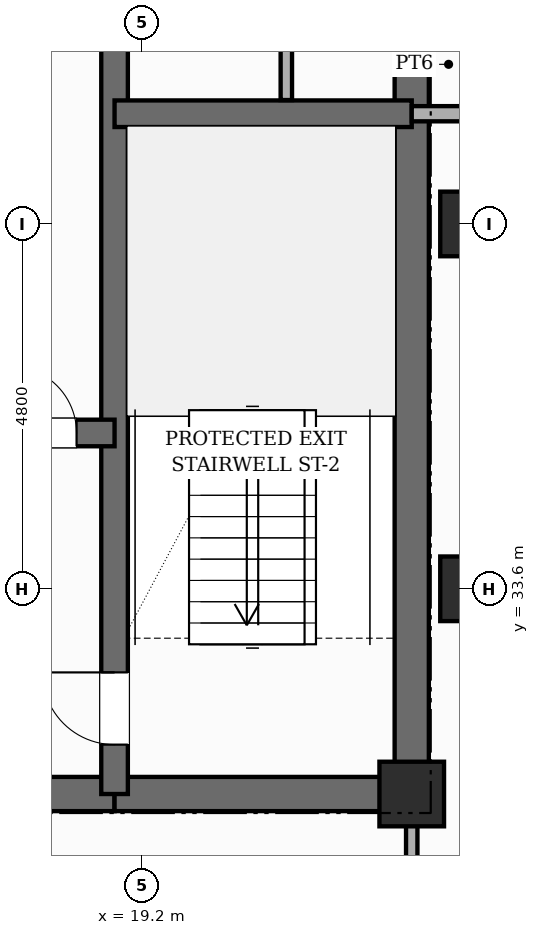
"""IFC4 building model, lengths in metres.
Left out: names, types, materials, properties, quantities, classifications, styles, units other than length and angle.
Written with IfcOpenShell. Run it as: python <this file> out.ifc"""

import sys

from ifc_helpers import new_model, si_unit, direction, frame, frame_2d, origin, origin_2d, place, context, subcontext, project, spatial, rectangle, extrude, element, fill, save


model = new_model("IFC4")
c1 = context("Model", 3, precision=1e-05, world=origin(), true_north=direction((0.0, 1.0)))
c2 = subcontext(c1, "Body", "Model", "MODEL_VIEW")
j1 = project(units=[si_unit("LENGTHUNIT", "METRE"), si_unit("PLANEANGLEUNIT", "RADIAN")], contexts=[c1])
p1 = place(None, origin())
s1 = spatial("IfcSite", under=j1, at=p1, CompositionType="ELEMENT")
p2 = place(p1, origin())
s2 = spatial("IfcBuilding", under=s1, at=p2, CompositionType="ELEMENT")
p3 = place(p2, frame((0.0, 0.0, 239.8)))
s3 = spatial("IfcBuildingStorey", under=s2, at=p3, CompositionType="ELEMENT", Elevation=239.8)
p4 = place(p3, frame((22.75, 30.675, 0.0), z_axis=(0.0, 0.0, 1.0), x_axis=(0.0, 1.0, 0.0)))
e1 = element("IfcWall", 1, at=p4, inside=s3, PredefinedType="SHEAR", context=c2, shape_type="SweptSolid", body=[
    extrude(rectangle(XDim=15.35, YDim=0.45, at=frame_2d((7.675, 0.0))), origin(), (0.0, 0.0, 1.0), 4.3),
])
p5 = place(p3, frame((9.96, 30.9, 0.0), z_axis=(0.0, 0.0, 1.0), x_axis=(1.0, 0.0, 0.0)))
e2 = element("IfcWall", 2, at=p5, inside=s3, PredefinedType="SHEAR", context=c2, shape_type="SweptSolid", body=[
    extrude(rectangle(XDim=8.88, YDim=0.45, at=frame_2d((4.44, 0.0))), origin(), (0.0, 0.0, 1.0), 4.3),
])
p6 = place(p5, frame((4.09, 0.0, 0.0)))
e3 = element("IfcOpeningElement", 3, at=p6, cuts=e2, PredefinedType="OPENING", context=c2, shape_type="SweptSolid", body=[
    extrude(rectangle(XDim=1.0, YDim=2.15, at=frame_2d((0.5, 1.075))), frame((0.0, 0.235, 0.0), z_axis=(0.0, -1.0, 0.0), x_axis=(1.0, 0.0, 0.0)), (0.0, 0.0, 1.0), 0.47),
])
p7 = place(p3, frame((18.84, 30.9, 0.0), z_axis=(0.0, 0.0, 1.0), x_axis=(1.0, 0.0, 0.0)))
e4 = element("IfcWall", 4, at=p7, inside=s3, PredefinedType="SHEAR", context=c2, shape_type="SweptSolid", body=[
    extrude(rectangle(XDim=3.91, YDim=0.45, at=frame_2d((1.955, 0.0))), origin(), (0.0, 0.0, 1.0), 4.3),
])
p8 = place(p3, frame((18.84, 30.9, 0.0), z_axis=(0.0, 0.0, 1.0), x_axis=(0.0, 1.0, 0.0)))
e5 = element("IfcWall", 5, at=p8, inside=s3, PredefinedType="SHEAR", context=c2, shape_type="SweptSolid", body=[
    extrude(rectangle(XDim=14.9, YDim=0.35, at=frame_2d((7.45, 0.0))), origin(), (0.0, 0.0, 1.0), 4.3),
])
p9 = place(p8, frame((0.65, 0.0, 0.0)))
e6 = element("IfcOpeningElement", 6, at=p9, cuts=e5, PredefinedType="OPENING", context=c2, shape_type="SweptSolid", body=[
    extrude(rectangle(XDim=0.95, YDim=2.1, at=frame_2d((0.475, 1.05))), frame((0.0, 0.185, 0.0), z_axis=(0.0, -1.0, 0.0), x_axis=(1.0, 0.0, 0.0)), (0.0, 0.0, 1.0), 0.37),
])
p10 = place(p8, frame((10.45, 0.0, 0.0)))
e7 = element("IfcOpeningElement", 7, at=p10, cuts=e5, PredefinedType="OPENING", context=c2, shape_type="SweptSolid", body=[
    extrude(rectangle(XDim=1.0, YDim=2.15, at=frame_2d((0.5, 1.075))), frame((0.0, 0.185, 0.0), z_axis=(0.0, -1.0, 0.0), x_axis=(1.0, 0.0, 0.0)), (0.0, 0.0, 1.0), 0.37),
])
p11 = place(p3, frame((18.84, 39.85, 0.0), z_axis=(0.0, 0.0, 1.0), x_axis=(1.0, 0.0, 0.0)))
e8 = element("IfcWall", 8, at=p11, inside=s3, PredefinedType="SHEAR", context=c2, shape_type="SweptSolid", body=[
    extrude(rectangle(XDim=3.91, YDim=0.35, at=frame_2d((1.955, 0.0))), origin(), (0.0, 0.0, 1.0), 4.3),
])
p12 = place(p3, frame((9.96, 35.65, 0.0), z_axis=(0.0, 0.0, 1.0), x_axis=(1.0, 0.0, 0.0)))
e9 = element("IfcWall", 9, at=p12, inside=s3, PredefinedType="SHEAR", context=c2, shape_type="SweptSolid", body=[
    extrude(rectangle(XDim=8.88, YDim=0.35, at=frame_2d((4.44, 0.0))), origin(), (0.0, 0.0, 1.0), 4.3),
])
p13 = place(p12, frame((0.84, 0.0, 0.0)))
e10 = element("IfcOpeningElement", 10, at=p13, cuts=e9, PredefinedType="OPENING", context=c2, shape_type="SweptSolid", body=[
    extrude(rectangle(XDim=1.1, YDim=2.15, at=frame_2d((0.55, 1.075))), frame((0.0, 0.185, 0.0), z_axis=(0.0, -1.0, 0.0), x_axis=(1.0, 0.0, 0.0)), (0.0, 0.0, 1.0), 0.37),
])
p14 = place(p12, frame((5.24, 0.0, 0.0)))
e11 = element("IfcOpeningElement", 11, at=p14, cuts=e9, PredefinedType="OPENING", context=c2, shape_type="SweptSolid", body=[
    extrude(rectangle(XDim=1.1, YDim=2.15, at=frame_2d((0.55, 1.075))), frame((0.0, 0.185, 0.0), z_axis=(0.0, -1.0, 0.0), x_axis=(1.0, 0.0, 0.0)), (0.0, 0.0, 1.0), 0.37),
])
p15 = place(p12, frame((7.5, 0.0, 0.0)))
e12 = element("IfcOpeningElement", 12, at=p15, cuts=e9, PredefinedType="OPENING", context=c2, shape_type="SweptSolid", body=[
    extrude(rectangle(XDim=0.88, YDim=2.1, at=frame_2d((0.44, 1.05))), frame((0.0, 0.185, 0.0), z_axis=(0.0, -1.0, 0.0), x_axis=(1.0, 0.0, 0.0)), (0.0, 0.0, 1.0), 0.37),
])
for number, where, z_axis, x_axis in (
    (13, (22.75, 30.9, 0.0), (0.0, 0.0, 1.0), (1.0, 0.0, 0.0)),
    (14, (23.55, 33.6, 0.0), (0.0, 0.0, 1.0), (1.0, 0.0, 0.0)),
    (15, (23.55, 38.4, 0.0), (0.0, 0.0, 1.0), (1.0, 0.0, 0.0)),
):
    element("IfcColumn", number, at=place(p3, frame(where, z_axis=z_axis, x_axis=x_axis)), inside=s3, PredefinedType="COLUMN", context=c2, shape_type="SweptSolid", body=[
        extrude(rectangle(XDim=0.85, YDim=0.85, at=origin_2d()), origin(), (0.0, 0.0, 1.0), 4.3),
    ])
p16 = place(p3, frame((21.1, 40.03, 0.0), z_axis=(0.0, 0.0, 1.0), x_axis=(0.0, 1.0, 0.0)))
e16 = element("IfcWall", 16, at=p16, inside=s3, PredefinedType="PARTITIONING", context=c2, shape_type="SweptSolid", body=[
    extrude(rectangle(XDim=5.77, YDim=0.15, at=frame_2d((2.885, 0.0))), origin(), (0.0, 0.0, 1.0), 4.04),
])
p17 = place(p16, frame((1.2, 0.0, 0.0)))
e17 = element("IfcOpeningElement", 17, at=p17, cuts=e16, PredefinedType="OPENING", context=c2, shape_type="SweptSolid", body=[
    extrude(rectangle(XDim=0.95, YDim=2.15, at=frame_2d((0.475, 1.075))), frame((0.0, 0.085, 0.0), z_axis=(0.0, -1.0, 0.0), x_axis=(1.0, 0.0, 0.0)), (0.0, 0.0, 1.0), 0.17),
])
p18 = place(p3, frame((22.75, 39.85, 0.0), z_axis=(0.0, 0.0, 1.0), x_axis=(1.0, 0.0, 0.0)))
e18 = element("IfcWall", 18, at=p18, inside=s3, PredefinedType="POLYGONAL", context=c2, shape_type="SweptSolid", body=[
    extrude(rectangle(XDim=0.97, YDim=0.2, at=frame_2d((0.485, 0.0))), origin(), (0.0, 0.0, 1.0), 4.04),
])
p19 = place(p3, frame((22.75, 25.75, 0.0), z_axis=(0.0, 0.0, 1.0), x_axis=(0.0, 1.0, 0.0)))
e19 = element("IfcWall", 19, at=p19, inside=s3, PredefinedType="PARTITIONING", context=c2, shape_type="SweptSolid", body=[
    extrude(rectangle(XDim=5.15, YDim=0.15, at=frame_2d((2.575, 0.0))), origin(), (0.0, 0.0, 1.0), 4.04),
])
p20 = place(p9, origin())
e20 = element("IfcDoor", 20, at=p20, inside=s3, OperationType="SINGLE_SWING_RIGHT", PredefinedType="DOOR", context=c2, shape_type="SweptSolid", body=[
    extrude(rectangle(XDim=0.95, YDim=2.1, at=frame_2d((0.475, 1.05))), frame((0.0, 0.025, 0.0), z_axis=(0.0, -1.0, 0.0), x_axis=(1.0, 0.0, 0.0)), (0.0, 0.0, 1.0), 0.05),
])
fill(e6, e20)
p21 = place(p15, origin())
e21 = element("IfcDoor", 21, at=p21, inside=s3, OperationType="SINGLE_SWING_LEFT", PredefinedType="DOOR", context=c2, shape_type="SweptSolid", body=[
    extrude(rectangle(XDim=0.88, YDim=2.1, at=frame_2d((0.44, 1.05))), frame((0.0, 0.025, 0.0), z_axis=(0.0, -1.0, 0.0), x_axis=(1.0, 0.0, 0.0)), (0.0, 0.0, 1.0), 0.05),
])
fill(e12, e21)
save(model, sys.argv[1])
